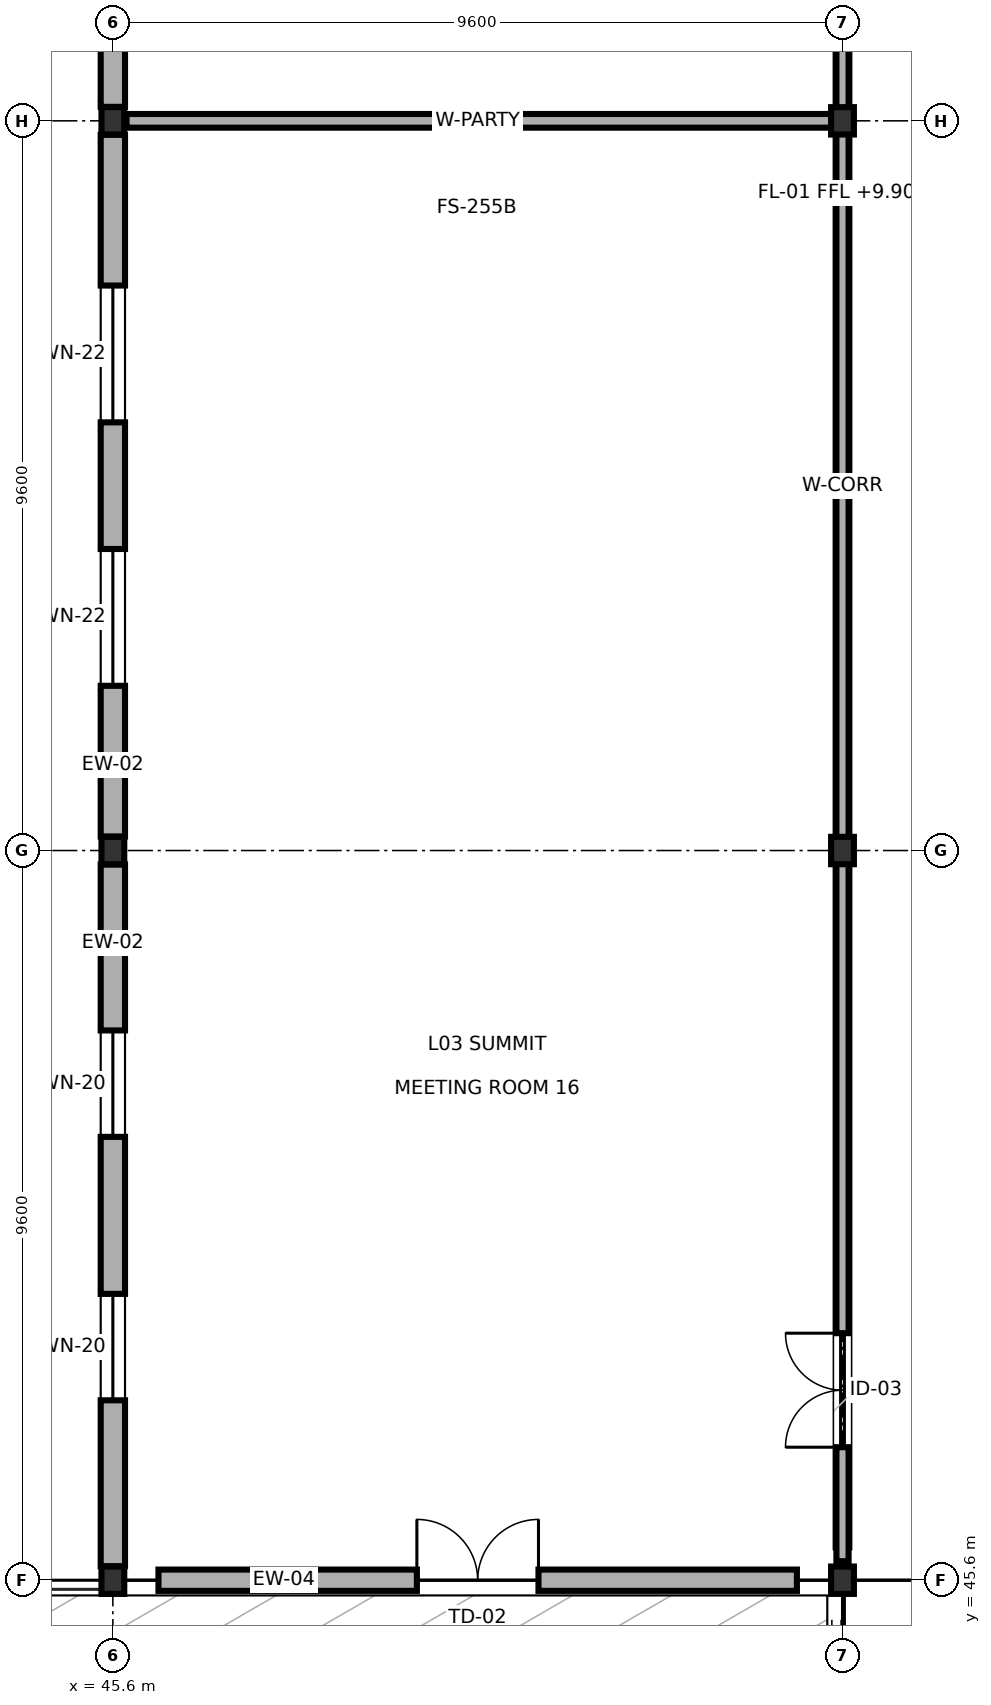
"""IFC4 building model, lengths in metres.
Left out: names, types, materials, properties, quantities, classifications, styles, units other than length and angle.
Written with IfcOpenShell. Run it as: python <this file> out.ifc"""

import sys

from ifc_helpers import new_model, si_unit, direction, frame, frame_2d, origin, origin_2d, place, context, subcontext, project, spatial, rectangle, i_section, extrude, element, fill, save


model = new_model("IFC4")
c1 = context("Model", 3, precision=1e-05, world=origin(), true_north=direction((0.0, 1.0)))
c2 = subcontext(c1, "Body", "Model", "MODEL_VIEW")
j1 = project(units=[si_unit("LENGTHUNIT", "METRE"), si_unit("PLANEANGLEUNIT", "RADIAN")], contexts=[c1])
p1 = place(None, origin())
s1 = spatial("IfcSite", under=j1, at=p1, CompositionType="ELEMENT")
p2 = place(p1, origin())
s2 = spatial("IfcBuilding", under=s1, at=p2, CompositionType="ELEMENT")
p3 = place(p2, frame((0.0, 0.0, 9.9)))
s3 = spatial("IfcBuildingStorey", under=s2, at=p3, CompositionType="ELEMENT", Elevation=9.9)
for number, where, z_axis, x_axis in (
    (1, (45.6, 45.6, 0.0), (0.0, 0.0, 1.0), (1.0, 0.0, 0.0)),
    (2, (45.6, 55.2, 0.0), (0.0, 0.0, 1.0), (1.0, 0.0, 0.0)),
    (3, (45.6, 64.8, 0.0), (0.0, 0.0, 1.0), (1.0, 0.0, 0.0)),
    (4, (55.2, 45.6, 0.0), (0.0, 0.0, 1.0), (1.0, 0.0, 0.0)),
    (5, (55.2, 55.2, 0.0), (0.0, 0.0, 1.0), (1.0, 0.0, 0.0)),
    (6, (55.2, 64.8, 0.0), (0.0, 0.0, 1.0), (1.0, 0.0, 0.0)),
):
    element("IfcColumn", number, at=place(p3, frame(where, z_axis=z_axis, x_axis=x_axis)), inside=s3, PredefinedType="COLUMN", context=c2, shape_type="SweptSolid", body=[
        extrude(i_section(OverallWidth=0.3, OverallDepth=0.36, WebThickness=0.012, FlangeThickness=0.022, FilletRadius=0.027, at=origin_2d()), origin(), (0.0, 0.0, 1.0), 4.8),
    ])
p4 = place(p3, frame((45.6, 45.784, 0.0), z_axis=(0.0, 0.0, 1.0), x_axis=(0.0, 1.0, 0.0)))
e7 = element("IfcWall", 7, at=p4, inside=s3, PredefinedType="SOLIDWALL", context=c2, shape_type="SweptSolid", body=[
    extrude(rectangle(XDim=9.232, YDim=0.32, at=frame_2d((4.616, 0.0))), origin(), (0.0, 0.0, 1.0), 4.025),
])
p5 = place(p4, frame((2.183, 0.0, 0.75)))
e8 = element("IfcOpeningElement", 8, at=p5, cuts=e7, PredefinedType="OPENING", context=c2, shape_type="SweptSolid", body=[
    extrude(rectangle(XDim=1.4, YDim=1.8, at=frame_2d((0.7, 0.9))), frame((0.0, 0.17, 0.0), z_axis=(0.0, -1.0, 0.0), x_axis=(1.0, 0.0, 0.0)), (0.0, 0.0, 1.0), 0.34),
])
p6 = place(p4, frame((5.649, 0.0, 0.75)))
e9 = element("IfcOpeningElement", 9, at=p6, cuts=e7, PredefinedType="OPENING", context=c2, shape_type="SweptSolid", body=[
    extrude(rectangle(XDim=1.4, YDim=1.8, at=frame_2d((0.7, 0.9))), frame((0.0, 0.17, 0.0), z_axis=(0.0, -1.0, 0.0), x_axis=(1.0, 0.0, 0.0)), (0.0, 0.0, 1.0), 0.34),
])
p7 = place(p3, frame((45.6, 55.384, 0.0), z_axis=(0.0, 0.0, 1.0), x_axis=(0.0, 1.0, 0.0)))
e10 = element("IfcWall", 10, at=p7, inside=s3, PredefinedType="SOLIDWALL", context=c2, shape_type="SweptSolid", body=[
    extrude(rectangle(XDim=9.232, YDim=0.32, at=frame_2d((4.616, 0.0))), origin(), (0.0, 0.0, 1.0), 4.025),
])
p8 = place(p7, frame((1.983, 0.0, 0.75)))
e11 = element("IfcOpeningElement", 11, at=p8, cuts=e10, PredefinedType="OPENING", context=c2, shape_type="SweptSolid", body=[
    extrude(rectangle(XDim=1.8, YDim=1.8, at=frame_2d((0.9, 0.9))), frame((0.0, 0.17, 0.0), z_axis=(0.0, -1.0, 0.0), x_axis=(1.0, 0.0, 0.0)), (0.0, 0.0, 1.0), 0.34),
])
p9 = place(p7, frame((5.449, 0.0, 0.75)))
e12 = element("IfcOpeningElement", 12, at=p9, cuts=e10, PredefinedType="OPENING", context=c2, shape_type="SweptSolid", body=[
    extrude(rectangle(XDim=1.8, YDim=1.8, at=frame_2d((0.9, 0.9))), frame((0.0, 0.17, 0.0), z_axis=(0.0, -1.0, 0.0), x_axis=(1.0, 0.0, 0.0)), (0.0, 0.0, 1.0), 0.34),
])
p10 = place(p3, frame((45.6, 64.984, 0.0), z_axis=(0.0, 0.0, 1.0), x_axis=(0.0, 1.0, 0.0)))
e13 = element("IfcWall", 13, at=p10, inside=s3, PredefinedType="SOLIDWALL", context=c2, shape_type="SweptSolid", body=[
    extrude(rectangle(XDim=9.232, YDim=0.32, at=frame_2d((4.616, 0.0))), origin(), (0.0, 0.0, 1.0), 4.025),
])
p11 = place(p10, frame((1.683, 0.0, 0.75)))
e14 = element("IfcOpeningElement", 14, at=p11, cuts=e13, PredefinedType="OPENING", context=c2, shape_type="SweptSolid", body=[
    extrude(rectangle(XDim=2.4, YDim=1.8, at=frame_2d((1.2, 0.9))), frame((0.0, 0.17, 0.0), z_axis=(0.0, -1.0, 0.0), x_axis=(1.0, 0.0, 0.0)), (0.0, 0.0, 1.0), 0.34),
])
p12 = place(p10, frame((5.149, 0.0, 0.75)))
e15 = element("IfcOpeningElement", 15, at=p12, cuts=e13, PredefinedType="OPENING", context=c2, shape_type="SweptSolid", body=[
    extrude(rectangle(XDim=2.4, YDim=1.8, at=frame_2d((1.2, 0.9))), frame((0.0, 0.17, 0.0), z_axis=(0.0, -1.0, 0.0), x_axis=(1.0, 0.0, 0.0)), (0.0, 0.0, 1.0), 0.34),
])
p13 = place(p3, frame((46.2, 45.6, 0.0), z_axis=(0.0, 0.0, 1.0), x_axis=(1.0, 0.0, 0.0)))
e16 = element("IfcWall", 16, at=p13, inside=s3, PredefinedType="SOLIDWALL", context=c2, shape_type="SweptSolid", body=[
    extrude(rectangle(XDim=8.4, YDim=0.28, at=frame_2d((4.2, 0.0))), origin(), (0.0, 0.0, 1.0), 4.085),
])
p14 = place(p13, frame((3.4, 0.0, 0.0)))
e17 = element("IfcOpeningElement", 17, at=p14, cuts=e16, PredefinedType="OPENING", context=c2, shape_type="SweptSolid", body=[
    extrude(rectangle(XDim=1.6, YDim=2.2, at=frame_2d((0.8, 1.1))), frame((0.0, 0.15, 0.0), z_axis=(0.0, -1.0, 0.0), x_axis=(1.0, 0.0, 0.0)), (0.0, 0.0, 1.0), 0.3),
])
p15 = place(p3, frame((55.2, 45.85, 0.0), z_axis=(0.0, 0.0, 1.0), x_axis=(0.0, 1.0, 0.0)))
e18 = element("IfcWall", 18, at=p15, inside=s3, PredefinedType="PARTITIONING", context=c2, shape_type="SweptSolid", body=[
    extrude(rectangle(XDim=18.85, YDim=0.16, at=frame_2d((9.425, 0.0))), origin(), (0.0, 0.0, 1.0), 4.025),
])
p16 = place(p15, frame((1.5, 0.0, 0.0)))
e19 = element("IfcOpeningElement", 19, at=p16, cuts=e18, PredefinedType="OPENING", context=c2, shape_type="SweptSolid", body=[
    extrude(rectangle(XDim=1.5, YDim=2.25, at=frame_2d((0.75, 1.125))), frame((0.0, 0.09, 0.0), z_axis=(0.0, -1.0, 0.0), x_axis=(1.0, 0.0, 0.0)), (0.0, 0.0, 1.0), 0.18),
])
p17 = place(p3, frame((45.78, 64.8, 0.0), z_axis=(0.0, 0.0, 1.0), x_axis=(1.0, 0.0, 0.0)))
e20 = element("IfcWall", 20, at=p17, inside=s3, PredefinedType="PARTITIONING", context=c2, shape_type="SweptSolid", body=[
    extrude(rectangle(XDim=9.33, YDim=0.18, at=frame_2d((4.665, 0.0))), origin(), (0.0, 0.0, 1.0), 4.025),
])
p18 = place(p3, frame((55.2, 64.9, 0.0), z_axis=(0.0, 0.0, 1.0), x_axis=(0.0, 1.0, 0.0)))
e21 = element("IfcWall", 21, at=p18, inside=s3, PredefinedType="PARTITIONING", context=c2, shape_type="SweptSolid", body=[
    extrude(rectangle(XDim=19.0, YDim=0.16, at=frame_2d((9.5, 0.0))), origin(), (0.0, 0.0, 1.0), 4.025),
])
p19 = place(p18, frame((1.5, 0.0, 0.0)))
e22 = element("IfcOpeningElement", 22, at=p19, cuts=e21, PredefinedType="OPENING", context=c2, shape_type="SweptSolid", body=[
    extrude(rectangle(XDim=1.5, YDim=2.25, at=frame_2d((0.75, 1.125))), frame((0.0, 0.09, 0.0), z_axis=(0.0, -1.0, 0.0), x_axis=(1.0, 0.0, 0.0)), (0.0, 0.0, 1.0), 0.18),
])
p20 = place(p5, origin())
e23 = element("IfcWindow", 23, at=p20, inside=s3, PartitioningType="SINGLE_PANEL", PredefinedType="WINDOW", context=c2, shape_type="SweptSolid", body=[
    extrude(rectangle(XDim=1.4, YDim=1.8, at=frame_2d((0.7, 0.9))), frame((0.0, 0.03, 0.0), z_axis=(0.0, -1.0, 0.0), x_axis=(1.0, 0.0, 0.0)), (0.0, 0.0, 1.0), 0.06),
])
fill(e8, e23)
p21 = place(p6, origin())
e24 = element("IfcWindow", 24, at=p21, inside=s3, PartitioningType="SINGLE_PANEL", PredefinedType="WINDOW", context=c2, shape_type="SweptSolid", body=[
    extrude(rectangle(XDim=1.4, YDim=1.8, at=frame_2d((0.7, 0.9))), frame((0.0, 0.03, 0.0), z_axis=(0.0, -1.0, 0.0), x_axis=(1.0, 0.0, 0.0)), (0.0, 0.0, 1.0), 0.06),
])
fill(e9, e24)
p22 = place(p8, origin())
e25 = element("IfcWindow", 25, at=p22, inside=s3, PartitioningType="SINGLE_PANEL", PredefinedType="WINDOW", context=c2, shape_type="SweptSolid", body=[
    extrude(rectangle(XDim=1.8, YDim=1.8, at=frame_2d((0.9, 0.9))), frame((0.0, 0.03, 0.0), z_axis=(0.0, -1.0, 0.0), x_axis=(1.0, 0.0, 0.0)), (0.0, 0.0, 1.0), 0.06),
])
fill(e11, e25)
p23 = place(p9, origin())
e26 = element("IfcWindow", 26, at=p23, inside=s3, PartitioningType="SINGLE_PANEL", PredefinedType="WINDOW", context=c2, shape_type="SweptSolid", body=[
    extrude(rectangle(XDim=1.8, YDim=1.8, at=frame_2d((0.9, 0.9))), frame((0.0, 0.03, 0.0), z_axis=(0.0, -1.0, 0.0), x_axis=(1.0, 0.0, 0.0)), (0.0, 0.0, 1.0), 0.06),
])
fill(e12, e26)
p24 = place(p14, origin())
e27 = element("IfcDoor", 27, at=p24, inside=s3, OperationType="DOUBLE_DOOR_SINGLE_SWING", PredefinedType="DOOR", context=c2, shape_type="SweptSolid", body=[
    extrude(rectangle(XDim=1.6, YDim=2.2, at=frame_2d((0.8, 1.1))), frame((0.0, 0.025, 0.0), z_axis=(0.0, -1.0, 0.0), x_axis=(1.0, 0.0, 0.0)), (0.0, 0.0, 1.0), 0.05),
])
fill(e17, e27)
p25 = place(p16, origin())
e28 = element("IfcDoor", 28, at=p25, inside=s3, OperationType="DOUBLE_DOOR_SINGLE_SWING", PredefinedType="DOOR", context=c2, shape_type="SweptSolid", body=[
    extrude(rectangle(XDim=1.5, YDim=2.25, at=frame_2d((0.75, 1.125))), frame((0.0, 0.025, 0.0), z_axis=(0.0, -1.0, 0.0), x_axis=(1.0, 0.0, 0.0)), (0.0, 0.0, 1.0), 0.05),
])
fill(e19, e28)
save(model, sys.argv[1])
